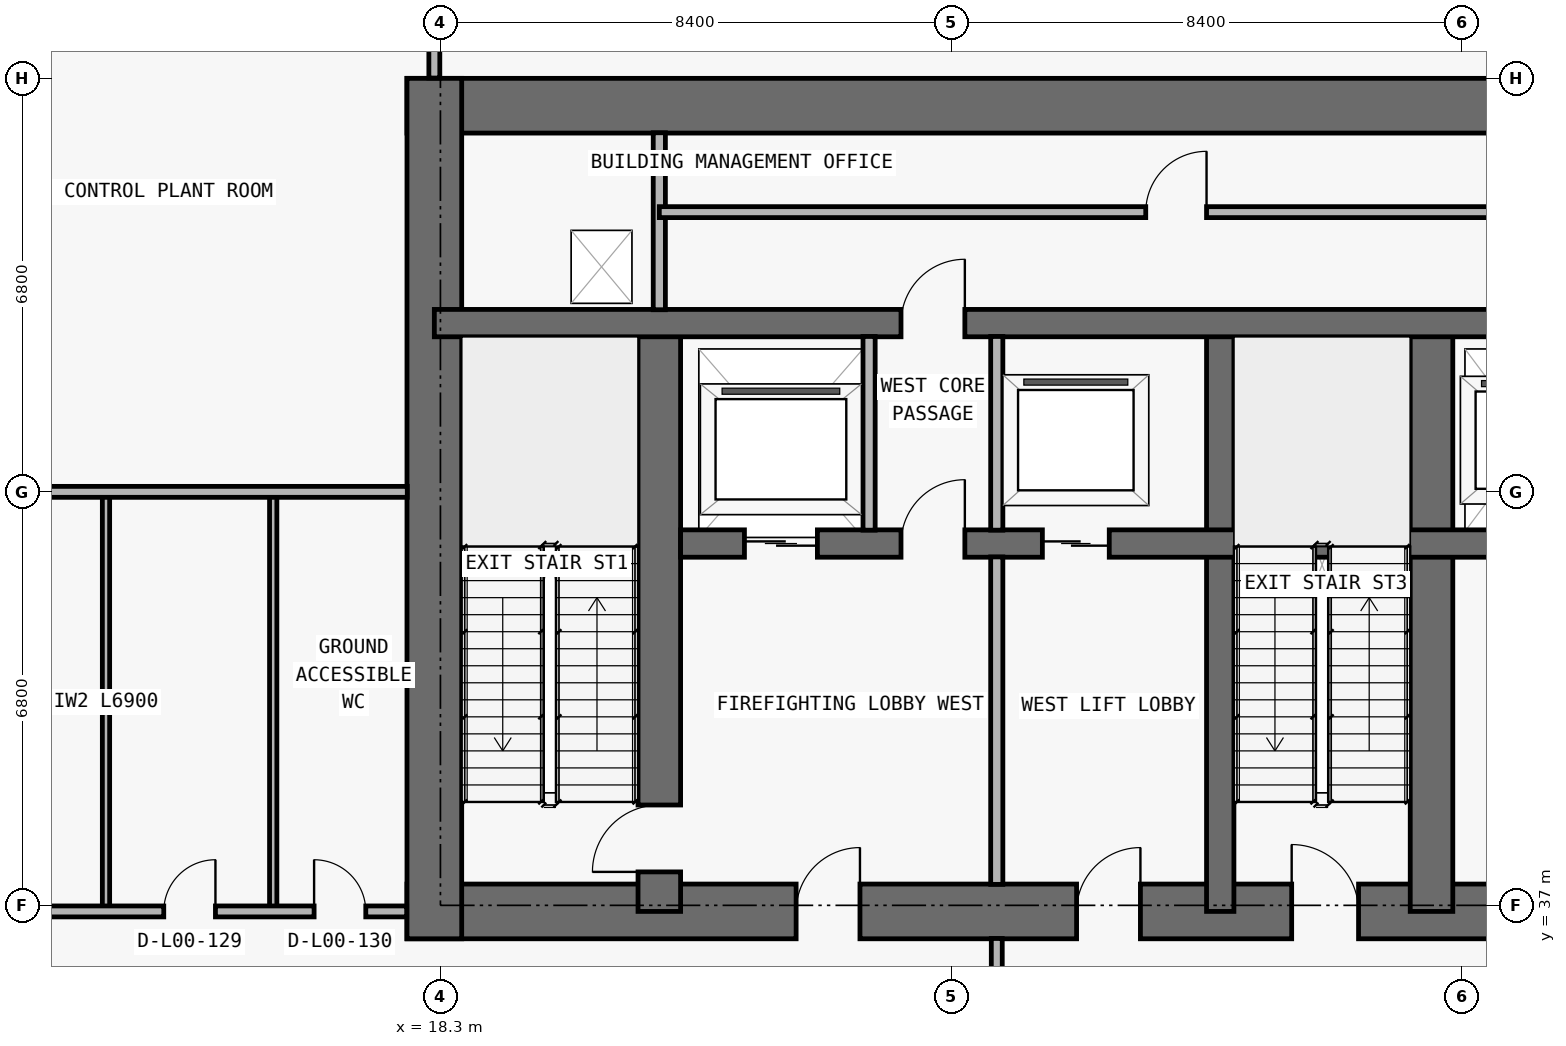
"""IFC4 building model, lengths in metres.
Left out: names, types, materials, properties, quantities, classifications, styles, units other than length and angle.
Written with IfcOpenShell. Run it as: python <this file> out.ifc"""

import sys

from ifc_helpers import new_model, si_unit, direction, frame, frame_2d, origin, place, context, subcontext, project, spatial, rectangle, extrude, element, fill, save


model = new_model("IFC4")
c1 = context("Model", 3, precision=1e-05, world=origin(), true_north=direction((0.0, 1.0)))
c2 = subcontext(c1, "Body", "Model", "MODEL_VIEW")
j1 = project(units=[si_unit("LENGTHUNIT", "METRE"), si_unit("PLANEANGLEUNIT", "RADIAN")], contexts=[c1])
p1 = place(None, origin())
s1 = spatial("IfcSite", under=j1, at=p1, CompositionType="ELEMENT")
p2 = place(p1, origin())
s2 = spatial("IfcBuilding", under=s1, at=p2, CompositionType="ELEMENT")
p3 = place(p2, origin())
s3 = spatial("IfcBuildingStorey", under=s2, at=p3, CompositionType="ELEMENT", Elevation=0.0)
p4 = place(p3, frame((17.75, 36.9, 0.0), z_axis=(0.0, 0.0, 1.0), x_axis=(1.0, 0.0, 0.0)))
e1 = element("IfcWall", 1, at=p4, inside=s3, PredefinedType="SHEAR", context=c2, shape_type="SweptSolid", body=[
    extrude(rectangle(XDim=42.3, YDim=0.9, at=frame_2d((21.15, 0.0))), origin(), (0.0, 0.0, 1.0), 5.1),
])
p5 = place(p4, frame((14.55, 0.0, 0.0)))
e2 = element("IfcOpeningElement", 2, at=p5, cuts=e1, PredefinedType="OPENING", context=c2, shape_type="SweptSolid", body=[
    extrude(rectangle(XDim=1.1, YDim=2.15, at=frame_2d((0.55, 1.075))), frame((0.0, 0.46, 0.0), z_axis=(0.0, -1.0, 0.0), x_axis=(1.0, 0.0, 0.0)), (0.0, 0.0, 1.0), 0.92),
])
p6 = place(p4, frame((6.4, 0.0, 0.0)))
e3 = element("IfcOpeningElement", 3, at=p6, cuts=e1, PredefinedType="OPENING", context=c2, shape_type="SweptSolid", body=[
    extrude(rectangle(XDim=1.05, YDim=2.15, at=frame_2d((0.525, 1.075))), frame((0.0, 0.46, 0.0), z_axis=(0.0, -1.0, 0.0), x_axis=(1.0, 0.0, 0.0)), (0.0, 0.0, 1.0), 0.92),
])
p7 = place(p4, frame((34.9, 0.0, 0.0)))
e4 = element("IfcOpeningElement", 4, at=p7, cuts=e1, PredefinedType="OPENING", context=c2, shape_type="SweptSolid", body=[
    extrude(rectangle(XDim=1.05, YDim=2.15, at=frame_2d((0.525, 1.075))), frame((0.0, 0.46, 0.0), z_axis=(0.0, -1.0, 0.0), x_axis=(1.0, 0.0, 0.0)), (0.0, 0.0, 1.0), 0.92),
])
p8 = place(p4, frame((11.012, 0.0, 0.0)))
e5 = element("IfcOpeningElement", 5, at=p8, cuts=e1, PredefinedType="OPENING", context=c2, shape_type="SweptSolid", body=[
    extrude(rectangle(XDim=1.05, YDim=2.15, at=frame_2d((0.525, 1.075))), frame((0.0, 0.46, 0.0), z_axis=(0.0, -1.0, 0.0), x_axis=(1.0, 0.0, 0.0)), (0.0, 0.0, 1.0), 0.92),
])
p9 = place(p4, frame((24.25, 0.0, 0.0)))
e6 = element("IfcOpeningElement", 6, at=p9, cuts=e1, PredefinedType="OPENING", context=c2, shape_type="SweptSolid", body=[
    extrude(rectangle(XDim=1.05, YDim=2.15, at=frame_2d((0.525, 1.075))), frame((0.0, 0.46, 0.0), z_axis=(0.0, -1.0, 0.0), x_axis=(1.0, 0.0, 0.0)), (0.0, 0.0, 1.0), 0.92),
])
p10 = place(p3, frame((17.75, 50.15, 0.0), z_axis=(0.0, 0.0, 1.0), x_axis=(1.0, 0.0, 0.0)))
e7 = element("IfcWall", 7, at=p10, inside=s3, PredefinedType="SHEAR", context=c2, shape_type="SweptSolid", body=[
    extrude(rectangle(XDim=42.3, YDim=0.9, at=frame_2d((21.15, 0.0))), origin(), (0.0, 0.0, 1.0), 5.1),
])
p11 = place(p3, frame((18.2, 36.45, 0.0), z_axis=(0.0, 0.0, 1.0), x_axis=(0.0, 1.0, 0.0)))
e8 = element("IfcWall", 8, at=p11, inside=s3, PredefinedType="SHEAR", context=c2, shape_type="SweptSolid", body=[
    extrude(rectangle(XDim=14.15, YDim=0.9, at=frame_2d((7.075, 0.0))), origin(), (0.0, 0.0, 1.0), 5.1),
])
p12 = place(p3, frame((21.9, 36.9, 0.0), z_axis=(0.0, 0.0, 1.0), x_axis=(0.0, 1.0, 0.0)))
e9 = element("IfcWall", 9, at=p12, inside=s3, PredefinedType="SHEAR", context=c2, shape_type="SweptSolid", body=[
    extrude(rectangle(XDim=9.675, YDim=0.7, at=frame_2d((4.837, 0.0))), origin(), (0.0, 0.0, 1.0), 5.1),
])
p13 = place(p12, frame((0.65, 0.0, 0.0)))
e10 = element("IfcOpeningElement", 10, at=p13, cuts=e9, PredefinedType="OPENING", context=c2, shape_type="SweptSolid", body=[
    extrude(rectangle(XDim=1.1, YDim=2.15, at=frame_2d((0.55, 1.075))), frame((0.0, 0.36, 0.0), z_axis=(0.0, -1.0, 0.0), x_axis=(1.0, 0.0, 0.0)), (0.0, 0.0, 1.0), 0.72),
])
p14 = place(p3, frame((31.125, 36.9, 0.0), z_axis=(0.0, 0.0, 1.0), x_axis=(0.0, 1.0, 0.0)))
e11 = element("IfcWall", 11, at=p14, inside=s3, PredefinedType="SHEAR", context=c2, shape_type="SweptSolid", body=[
    extrude(rectangle(XDim=9.675, YDim=0.45, at=frame_2d((4.837, 0.0))), origin(), (0.0, 0.0, 1.0), 5.1),
])
p15 = place(p3, frame((34.6, 36.9, 0.0), z_axis=(0.0, 0.0, 1.0), x_axis=(0.0, 1.0, 0.0)))
e12 = element("IfcWall", 12, at=p15, inside=s3, PredefinedType="SHEAR", context=c2, shape_type="SweptSolid", body=[
    extrude(rectangle(XDim=9.675, YDim=0.7, at=frame_2d((4.837, 0.0))), origin(), (0.0, 0.0, 1.0), 5.1),
])
p16 = place(p3, frame((22.25, 42.95, 0.0), z_axis=(0.0, 0.0, 1.0), x_axis=(1.0, 0.0, 0.0)))
e13 = element("IfcWall", 13, at=p16, inside=s3, PredefinedType="SHEAR", context=c2, shape_type="SweptSolid", body=[
    extrude(rectangle(XDim=33.3, YDim=0.45, at=frame_2d((16.65, 0.0))), origin(), (0.0, 0.0, 1.0), 5.1),
])
p17 = place(p16, frame((1.05, 0.0, 0.0)))
e14 = element("IfcOpeningElement", 14, at=p17, cuts=e13, PredefinedType="OPENING", context=c2, shape_type="SweptSolid", body=[
    extrude(rectangle(XDim=1.2, YDim=2.2, at=frame_2d((0.6, 1.1))), frame((0.0, 0.235, 0.0), z_axis=(0.0, -1.0, 0.0), x_axis=(1.0, 0.0, 0.0)), (0.0, 0.0, 1.0), 0.47),
])
p18 = place(p16, frame((31.05, 0.0, 0.0)))
e15 = element("IfcOpeningElement", 15, at=p18, cuts=e13, PredefinedType="OPENING", context=c2, shape_type="SweptSolid", body=[
    extrude(rectangle(XDim=1.2, YDim=2.2, at=frame_2d((0.6, 1.1))), frame((0.0, 0.235, 0.0), z_axis=(0.0, -1.0, 0.0), x_axis=(1.0, 0.0, 0.0)), (0.0, 0.0, 1.0), 0.47),
])
p19 = place(p16, frame((13.5, 0.0, 0.0)))
e16 = element("IfcOpeningElement", 16, at=p19, cuts=e13, PredefinedType="OPENING", context=c2, shape_type="SweptSolid", body=[
    extrude(rectangle(XDim=1.1, YDim=2.2, at=frame_2d((0.55, 1.1))), frame((0.0, 0.235, 0.0), z_axis=(0.0, -1.0, 0.0), x_axis=(1.0, 0.0, 0.0)), (0.0, 0.0, 1.0), 0.47),
])
p20 = place(p16, frame((16.1, 0.0, 0.0)))
e17 = element("IfcOpeningElement", 17, at=p20, cuts=e13, PredefinedType="OPENING", context=c2, shape_type="SweptSolid", body=[
    extrude(rectangle(XDim=1.1, YDim=2.2, at=frame_2d((0.55, 1.1))), frame((0.0, 0.235, 0.0), z_axis=(0.0, -1.0, 0.0), x_axis=(1.0, 0.0, 0.0)), (0.0, 0.0, 1.0), 0.47),
])
p21 = place(p16, frame((18.7, 0.0, 0.0)))
e18 = element("IfcOpeningElement", 18, at=p21, cuts=e13, PredefinedType="OPENING", context=c2, shape_type="SweptSolid", body=[
    extrude(rectangle(XDim=1.1, YDim=2.2, at=frame_2d((0.55, 1.1))), frame((0.0, 0.235, 0.0), z_axis=(0.0, -1.0, 0.0), x_axis=(1.0, 0.0, 0.0)), (0.0, 0.0, 1.0), 0.47),
])
p22 = place(p16, frame((21.4, 0.0, 0.0)))
e19 = element("IfcOpeningElement", 19, at=p22, cuts=e13, PredefinedType="OPENING", context=c2, shape_type="SweptSolid", body=[
    extrude(rectangle(XDim=1.1, YDim=2.2, at=frame_2d((0.55, 1.1))), frame((0.0, 0.235, 0.0), z_axis=(0.0, -1.0, 0.0), x_axis=(1.0, 0.0, 0.0)), (0.0, 0.0, 1.0), 0.47),
])
p23 = place(p16, frame((24.0, 0.0, 0.0)))
e20 = element("IfcOpeningElement", 20, at=p23, cuts=e13, PredefinedType="OPENING", context=c2, shape_type="SweptSolid", body=[
    extrude(rectangle(XDim=1.1, YDim=2.2, at=frame_2d((0.55, 1.1))), frame((0.0, 0.235, 0.0), z_axis=(0.0, -1.0, 0.0), x_axis=(1.0, 0.0, 0.0)), (0.0, 0.0, 1.0), 0.47),
])
p24 = place(p16, frame((26.45, 0.0, 0.0)))
e21 = element("IfcOpeningElement", 21, at=p24, cuts=e13, PredefinedType="OPENING", context=c2, shape_type="SweptSolid", body=[
    extrude(rectangle(XDim=1.1, YDim=2.2, at=frame_2d((0.55, 1.1))), frame((0.0, 0.235, 0.0), z_axis=(0.0, -1.0, 0.0), x_axis=(1.0, 0.0, 0.0)), (0.0, 0.0, 1.0), 0.47),
])
p25 = place(p16, frame((5.95, 0.0, 0.0)))
e22 = element("IfcOpeningElement", 22, at=p25, cuts=e13, PredefinedType="OPENING", context=c2, shape_type="SweptSolid", body=[
    extrude(rectangle(XDim=1.1, YDim=2.2, at=frame_2d((0.55, 1.1))), frame((0.0, 0.235, 0.0), z_axis=(0.0, -1.0, 0.0), x_axis=(1.0, 0.0, 0.0)), (0.0, 0.0, 1.0), 0.47),
])
p26 = place(p16, frame((3.625, 0.0, 0.0)))
e23 = element("IfcOpeningElement", 23, at=p26, cuts=e13, PredefinedType="OPENING", context=c2, shape_type="SweptSolid", body=[
    extrude(rectangle(XDim=1.05, YDim=2.15, at=frame_2d((0.525, 1.075))), frame((0.0, 0.235, 0.0), z_axis=(0.0, -1.0, 0.0), x_axis=(1.0, 0.0, 0.0)), (0.0, 0.0, 1.0), 0.47),
])
p27 = place(p16, frame((28.675, 0.0, 0.0)))
e24 = element("IfcOpeningElement", 24, at=p27, cuts=e13, PredefinedType="OPENING", context=c2, shape_type="SweptSolid", body=[
    extrude(rectangle(XDim=1.05, YDim=2.15, at=frame_2d((0.525, 1.075))), frame((0.0, 0.235, 0.0), z_axis=(0.0, -1.0, 0.0), x_axis=(1.0, 0.0, 0.0)), (0.0, 0.0, 1.0), 0.47),
])
p28 = place(p3, frame((18.2, 46.575, 0.0), z_axis=(0.0, 0.0, 1.0), x_axis=(1.0, 0.0, 0.0)))
e25 = element("IfcWall", 25, at=p28, inside=s3, PredefinedType="SHEAR", context=c2, shape_type="SweptSolid", body=[
    extrude(rectangle(XDim=41.4, YDim=0.45, at=frame_2d((20.7, 0.0))), origin(), (0.0, 0.0, 1.0), 5.1),
])
p29 = place(p28, frame((7.675, 0.0, 0.0)))
e26 = element("IfcOpeningElement", 26, at=p29, cuts=e25, PredefinedType="OPENING", context=c2, shape_type="SweptSolid", body=[
    extrude(rectangle(XDim=1.05, YDim=2.15, at=frame_2d((0.525, 1.075))), frame((0.0, 0.235, 0.0), z_axis=(0.0, -1.0, 0.0), x_axis=(1.0, 0.0, 0.0)), (0.0, 0.0, 1.0), 0.47),
])
p30 = place(p28, frame((32.725, 0.0, 0.0)))
e27 = element("IfcOpeningElement", 27, at=p30, cuts=e25, PredefinedType="OPENING", context=c2, shape_type="SweptSolid", body=[
    extrude(rectangle(XDim=1.05, YDim=2.15, at=frame_2d((0.525, 1.075))), frame((0.0, 0.235, 0.0), z_axis=(0.0, -1.0, 0.0), x_axis=(1.0, 0.0, 0.0)), (0.0, 0.0, 1.0), 0.47),
])
for number, where, z_axis, x_axis in (
    (28, (12.8, 36.9, 0.0), (0.0, 0.0, 1.0), (0.0, 1.0, 0.0)),
    (29, (15.55, 36.9, 0.0), (0.0, 0.0, 1.0), (0.0, 1.0, 0.0)),
):
    element("IfcWall", number, at=place(p3, frame(where, z_axis=z_axis, x_axis=x_axis)), inside=s3, PredefinedType="PARTITIONING", context=c2, shape_type="SweptSolid", body=[
        extrude(rectangle(XDim=6.9, YDim=0.12, at=frame_2d((3.45, 0.0))), origin(), (0.0, 0.0, 1.0), 5.1),
    ])
p31 = place(p3, frame((18.2, 50.605, 0.0), z_axis=(0.0, 0.0, 1.0), x_axis=(0.0, 1.0, 0.0)))
e30 = element("IfcWall", 30, at=p31, inside=s3, PredefinedType="PARTITIONING", context=c2, shape_type="SweptSolid", body=[
    extrude(rectangle(XDim=2.9, YDim=0.18, at=frame_2d((1.45, 0.0))), origin(), (0.0, 0.0, 1.0), 5.1),
])
p32 = place(p3, frame((21.9, 46.795, 0.0), z_axis=(0.0, 0.0, 1.0), x_axis=(0.0, 1.0, 0.0)))
e31 = element("IfcWall", 31, at=p32, inside=s3, PredefinedType="PARTITIONING", context=c2, shape_type="SweptSolid", body=[
    extrude(rectangle(XDim=2.91, YDim=0.2, at=frame_2d((1.455, 0.0))), origin(), (0.0, 0.0, 1.0), 5.1),
])
p33 = place(p3, frame((25.35, 43.17, 0.0), z_axis=(0.0, 0.0, 1.0), x_axis=(0.0, 1.0, 0.0)))
e32 = element("IfcWall", 32, at=p33, inside=s3, PredefinedType="PARTITIONING", context=c2, shape_type="SweptSolid", body=[
    extrude(rectangle(XDim=3.185, YDim=0.2, at=frame_2d((1.593, 0.0))), origin(), (0.0, 0.0, 1.0), 5.1),
])
p34 = place(p3, frame((27.45, 34.0, 0.0), z_axis=(0.0, 0.0, 1.0), x_axis=(0.0, 1.0, 0.0)))
e33 = element("IfcWall", 33, at=p34, inside=s3, PredefinedType="PARTITIONING", context=c2, shape_type="SweptSolid", body=[
    extrude(rectangle(XDim=2.455, YDim=0.18, at=frame_2d((1.228, 0.0))), origin(), (0.0, 0.0, 1.0), 5.1),
])
p35 = place(p34, frame((0.677, 0.0, 0.0)))
e34 = element("IfcOpeningElement", 34, at=p35, cuts=e33, PredefinedType="OPENING", context=c2, shape_type="SweptSolid", body=[
    extrude(rectangle(XDim=1.1, YDim=2.15, at=frame_2d((0.55, 1.075))), frame((0.0, 0.1, 0.0), z_axis=(0.0, -1.0, 0.0), x_axis=(1.0, 0.0, 0.0)), (0.0, 0.0, 1.0), 0.2),
])
p36 = place(p3, frame((27.45, 37.345, 0.0), z_axis=(0.0, 0.0, 1.0), x_axis=(0.0, 1.0, 0.0)))
e35 = element("IfcWall", 35, at=p36, inside=s3, PredefinedType="PARTITIONING", context=c2, shape_type="SweptSolid", body=[
    extrude(rectangle(XDim=5.385, YDim=0.2, at=frame_2d((2.692, 0.0))), origin(), (0.0, 0.0, 1.0), 5.1),
])
p37 = place(p3, frame((27.45, 43.17, 0.0), z_axis=(0.0, 0.0, 1.0), x_axis=(0.0, 1.0, 0.0)))
e36 = element("IfcWall", 36, at=p37, inside=s3, PredefinedType="PARTITIONING", context=c2, shape_type="SweptSolid", body=[
    extrude(rectangle(XDim=3.185, YDim=0.2, at=frame_2d((1.593, 0.0))), origin(), (0.0, 0.0, 1.0), 5.1),
])
p38 = place(p3, frame((0.295, 36.9, 0.0), z_axis=(0.0, 0.0, 1.0), x_axis=(1.0, 0.0, 0.0)))
e37 = element("IfcWall", 37, at=p38, inside=s3, PredefinedType="PARTITIONING", context=c2, shape_type="SweptSolid", body=[
    extrude(rectangle(XDim=17.45, YDim=0.18, at=frame_2d((8.725, 0.0))), origin(), (0.0, 0.0, 1.0), 5.1),
])
p39 = place(p38, frame((2.403, 0.0, 0.0)))
e38 = element("IfcOpeningElement", 38, at=p39, cuts=e37, PredefinedType="OPENING", context=c2, shape_type="SweptSolid", body=[
    extrude(rectangle(XDim=1.1, YDim=2.15, at=frame_2d((0.55, 1.075))), frame((0.0, 0.1, 0.0), z_axis=(0.0, -1.0, 0.0), x_axis=(1.0, 0.0, 0.0)), (0.0, 0.0, 1.0), 0.2),
])
p40 = place(p38, frame((8.68, 0.0, 0.0)))
e39 = element("IfcOpeningElement", 39, at=p40, cuts=e37, PredefinedType="OPENING", context=c2, shape_type="SweptSolid", body=[
    extrude(rectangle(XDim=1.05, YDim=2.15, at=frame_2d((0.525, 1.075))), frame((0.0, 0.1, 0.0), z_axis=(0.0, -1.0, 0.0), x_axis=(1.0, 0.0, 0.0)), (0.0, 0.0, 1.0), 0.2),
])
p41 = place(p38, frame((13.455, 0.0, 0.0)))
e40 = element("IfcOpeningElement", 40, at=p41, cuts=e37, PredefinedType="OPENING", context=c2, shape_type="SweptSolid", body=[
    extrude(rectangle(XDim=0.85, YDim=2.1, at=frame_2d((0.425, 1.05))), frame((0.0, 0.1, 0.0), z_axis=(0.0, -1.0, 0.0), x_axis=(1.0, 0.0, 0.0)), (0.0, 0.0, 1.0), 0.2),
])
p42 = place(p38, frame((15.927, 0.0, 0.0)))
e41 = element("IfcOpeningElement", 41, at=p42, cuts=e37, PredefinedType="OPENING", context=c2, shape_type="SweptSolid", body=[
    extrude(rectangle(XDim=0.85, YDim=2.1, at=frame_2d((0.425, 1.05))), frame((0.0, 0.1, 0.0), z_axis=(0.0, -1.0, 0.0), x_axis=(1.0, 0.0, 0.0)), (0.0, 0.0, 1.0), 0.2),
])
p43 = place(p3, frame((6.2, 43.8, 0.0), z_axis=(0.0, 0.0, 1.0), x_axis=(1.0, 0.0, 0.0)))
e42 = element("IfcWall", 42, at=p43, inside=s3, PredefinedType="PARTITIONING", context=c2, shape_type="SweptSolid", body=[
    extrude(rectangle(XDim=11.555, YDim=0.18, at=frame_2d((5.777, 0.0))), origin(), (0.0, 0.0, 1.0), 4.389),
])
p44 = place(p3, frame((21.9, 48.4, 0.0), z_axis=(0.0, 0.0, 1.0), x_axis=(1.0, 0.0, 0.0)))
e43 = element("IfcWall", 43, at=p44, inside=s3, PredefinedType="PARTITIONING", context=c2, shape_type="SweptSolid", body=[
    extrude(rectangle(XDim=34.0, YDim=0.18, at=frame_2d((17.0, 0.0))), origin(), (0.0, 0.0, 1.0), 5.1),
])
p45 = place(p44, frame((8.0, 0.0, 0.0)))
e44 = element("IfcOpeningElement", 44, at=p45, cuts=e43, PredefinedType="OPENING", context=c2, shape_type="SweptSolid", body=[
    extrude(rectangle(XDim=1.0, YDim=2.2, at=frame_2d((0.5, 1.1))), frame((0.0, 0.1, 0.0), z_axis=(0.0, -1.0, 0.0), x_axis=(1.0, 0.0, 0.0)), (0.0, 0.0, 1.0), 0.2),
])
p46 = place(p44, frame((25.0, 0.0, 0.0)))
e45 = element("IfcOpeningElement", 45, at=p46, cuts=e43, PredefinedType="OPENING", context=c2, shape_type="SweptSolid", body=[
    extrude(rectangle(XDim=1.0, YDim=2.2, at=frame_2d((0.5, 1.1))), frame((0.0, 0.1, 0.0), z_axis=(0.0, -1.0, 0.0), x_axis=(1.0, 0.0, 0.0)), (0.0, 0.0, 1.0), 0.2),
])
p47 = place(p17, origin())
e46 = element("IfcDoor", 46, at=p47, inside=s3, OperationType="DOUBLE_DOOR_SLIDING", PredefinedType="DOOR", context=c2, shape_type="SweptSolid", body=[
    extrude(rectangle(XDim=1.2, YDim=2.2, at=frame_2d((0.6, 1.1))), frame((0.0, 0.025, 0.0), z_axis=(0.0, -1.0, 0.0), x_axis=(1.0, 0.0, 0.0)), (0.0, 0.0, 1.0), 0.05),
])
fill(e14, e46)
p48 = place(p25, origin())
e47 = element("IfcDoor", 47, at=p48, inside=s3, OperationType="DOUBLE_DOOR_SLIDING", PredefinedType="DOOR", context=c2, shape_type="SweptSolid", body=[
    extrude(rectangle(XDim=1.1, YDim=2.2, at=frame_2d((0.55, 1.1))), frame((0.0, 0.025, 0.0), z_axis=(0.0, -1.0, 0.0), x_axis=(1.0, 0.0, 0.0)), (0.0, 0.0, 1.0), 0.05),
])
fill(e22, e47)
p49 = place(p5, origin())
e48 = element("IfcDoor", 48, at=p49, inside=s3, OperationType="SINGLE_SWING_LEFT", PredefinedType="DOOR", context=c2, shape_type="SweptSolid", body=[
    extrude(rectangle(XDim=1.1, YDim=2.15, at=frame_2d((0.55, 1.075))), frame((0.0, 0.025, 0.0), z_axis=(0.0, -1.0, 0.0), x_axis=(1.0, 0.0, 0.0)), (0.0, 0.0, 1.0), 0.05),
])
fill(e2, e48)
p50 = place(p6, origin())
e49 = element("IfcDoor", 49, at=p50, inside=s3, OperationType="SINGLE_SWING_RIGHT", PredefinedType="DOOR", context=c2, shape_type="SweptSolid", body=[
    extrude(rectangle(XDim=1.05, YDim=2.15, at=frame_2d((0.525, 1.075))), frame((0.0, 0.025, 0.0), z_axis=(0.0, -1.0, 0.0), x_axis=(1.0, 0.0, 0.0)), (0.0, 0.0, 1.0), 0.05),
])
fill(e3, e49)
p51 = place(p13, origin())
e50 = element("IfcDoor", 50, at=p51, inside=s3, OperationType="SINGLE_SWING_LEFT", PredefinedType="DOOR", context=c2, shape_type="SweptSolid", body=[
    extrude(rectangle(XDim=1.1, YDim=2.15, at=frame_2d((0.55, 1.075))), frame((0.0, 0.025, 0.0), z_axis=(0.0, -1.0, 0.0), x_axis=(1.0, 0.0, 0.0)), (0.0, 0.0, 1.0), 0.05),
])
fill(e10, e50)
p52 = place(p26, origin())
e51 = element("IfcDoor", 51, at=p52, inside=s3, OperationType="SINGLE_SWING_RIGHT", PredefinedType="DOOR", context=c2, shape_type="SweptSolid", body=[
    extrude(rectangle(XDim=1.05, YDim=2.15, at=frame_2d((0.525, 1.075))), frame((0.0, 0.025, 0.0), z_axis=(0.0, -1.0, 0.0), x_axis=(1.0, 0.0, 0.0)), (0.0, 0.0, 1.0), 0.05),
])
fill(e23, e51)
p53 = place(p8, origin())
e52 = element("IfcDoor", 52, at=p53, inside=s3, OperationType="SINGLE_SWING_RIGHT", PredefinedType="DOOR", context=c2, shape_type="SweptSolid", body=[
    extrude(rectangle(XDim=1.05, YDim=2.15, at=frame_2d((0.525, 1.075))), frame((0.0, 0.025, 0.0), z_axis=(0.0, -1.0, 0.0), x_axis=(1.0, 0.0, 0.0)), (0.0, 0.0, 1.0), 0.05),
])
fill(e5, e52)
p54 = place(p29, origin())
e53 = element("IfcDoor", 53, at=p54, inside=s3, OperationType="SINGLE_SWING_RIGHT", PredefinedType="DOOR", context=c2, shape_type="SweptSolid", body=[
    extrude(rectangle(XDim=1.05, YDim=2.15, at=frame_2d((0.525, 1.075))), frame((0.0, 0.025, 0.0), z_axis=(0.0, -1.0, 0.0), x_axis=(1.0, 0.0, 0.0)), (0.0, 0.0, 1.0), 0.05),
])
fill(e26, e53)
p55 = place(p45, origin())
e54 = element("IfcDoor", 54, at=p55, inside=s3, OperationType="SINGLE_SWING_RIGHT", PredefinedType="DOOR", context=c2, shape_type="SweptSolid", body=[
    extrude(rectangle(XDim=1.0, YDim=2.2, at=frame_2d((0.5, 1.1))), frame((0.0, 0.025, 0.0), z_axis=(0.0, -1.0, 0.0), x_axis=(1.0, 0.0, 0.0)), (0.0, 0.0, 1.0), 0.05),
])
fill(e44, e54)
p56 = place(p41, origin())
e55 = element("IfcDoor", 55, at=p56, inside=s3, OperationType="SINGLE_SWING_RIGHT", PredefinedType="DOOR", context=c2, shape_type="SweptSolid", body=[
    extrude(rectangle(XDim=0.85, YDim=2.1, at=frame_2d((0.425, 1.05))), frame((0.0, 0.025, 0.0), z_axis=(0.0, -1.0, 0.0), x_axis=(1.0, 0.0, 0.0)), (0.0, 0.0, 1.0), 0.05),
])
fill(e40, e55)
p57 = place(p42, origin())
e56 = element("IfcDoor", 56, at=p57, inside=s3, OperationType="SINGLE_SWING_LEFT", PredefinedType="DOOR", context=c2, shape_type="SweptSolid", body=[
    extrude(rectangle(XDim=0.85, YDim=2.1, at=frame_2d((0.425, 1.05))), frame((0.0, 0.025, 0.0), z_axis=(0.0, -1.0, 0.0), x_axis=(1.0, 0.0, 0.0)), (0.0, 0.0, 1.0), 0.05),
])
fill(e41, e56)
save(model, sys.argv[1])
